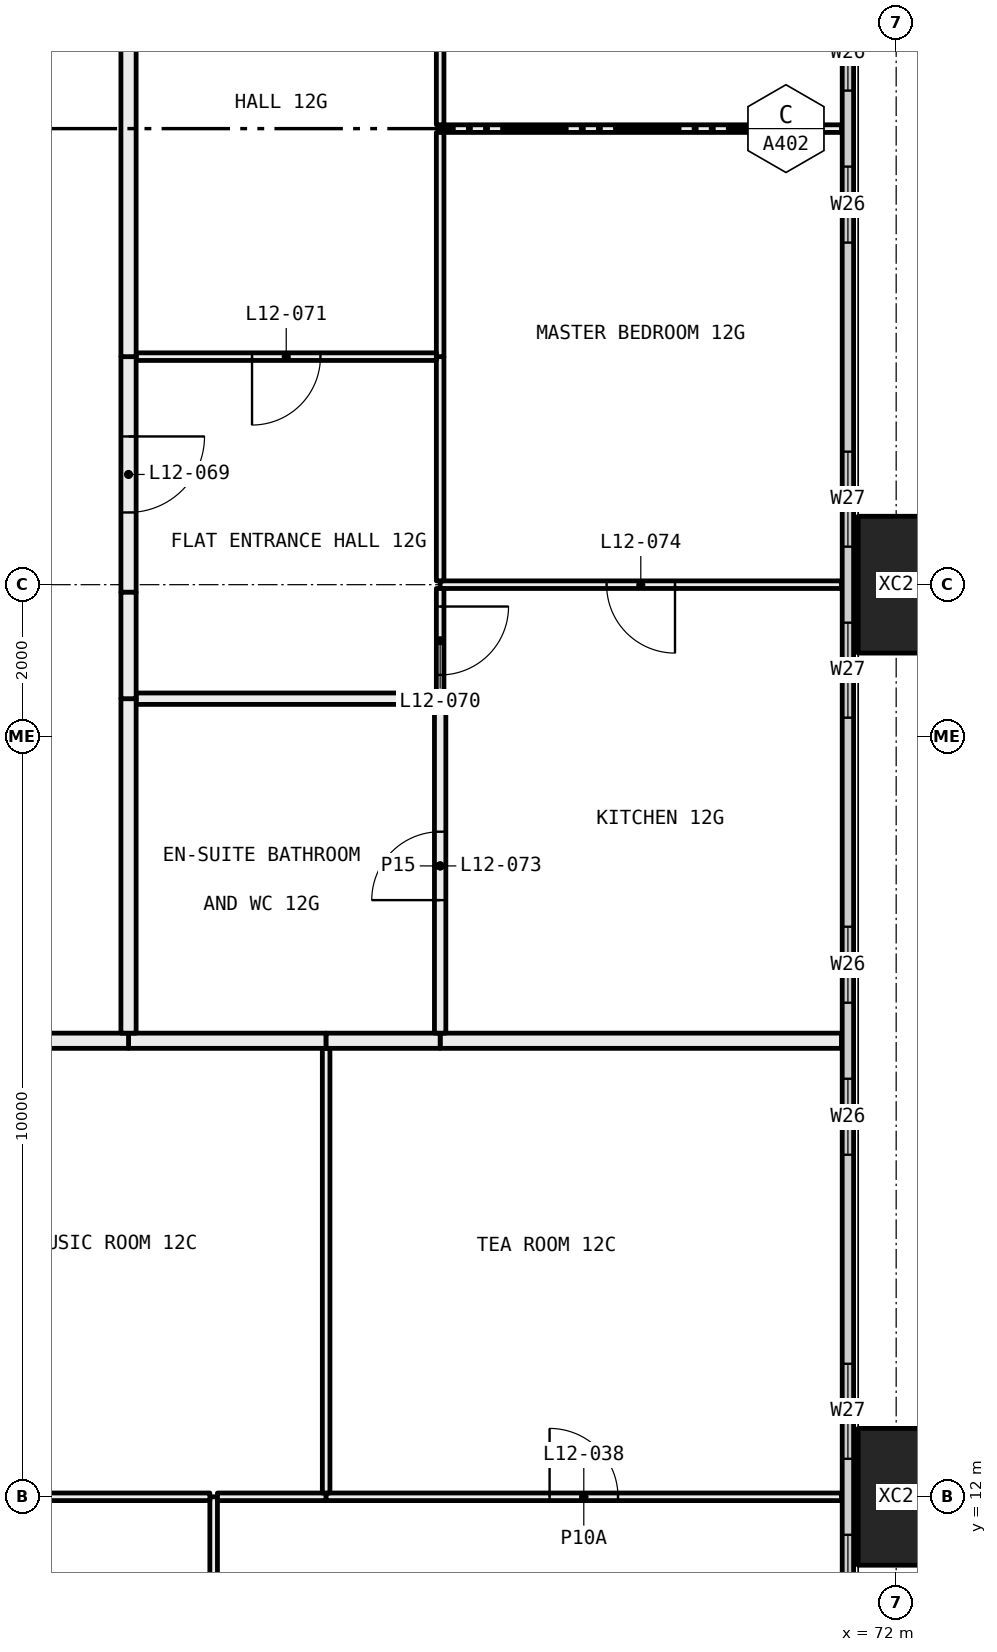
"""IFC4 building model, lengths in metres.
Left out: names, types, materials, properties, quantities, classifications, styles, units other than length and angle.
Written with IfcOpenShell. Run it as: python <this file> out.ifc"""

import sys

from ifc_helpers import new_model, si_unit, direction, frame, frame_2d, origin, origin_2d, place, context, subcontext, project, spatial, rectangle, hollow_rectangle, extrude, element, fill, save


model = new_model("IFC4")
c1 = context("Model", 3, precision=1e-05, world=origin(), true_north=direction((0.0, 1.0)))
c2 = subcontext(c1, "Body", "Model", "MODEL_VIEW")
j1 = project(units=[si_unit("LENGTHUNIT", "METRE"), si_unit("PLANEANGLEUNIT", "RADIAN")], contexts=[c1])
p1 = place(None, origin())
s1 = spatial("IfcSite", under=j1, at=p1, CompositionType="ELEMENT")
p2 = place(p1, origin())
s2 = spatial("IfcBuilding", under=s1, at=p2, CompositionType="ELEMENT")
p3 = place(p2, frame((0.0, 0.0, 54.15)))
s3 = spatial("IfcBuildingStorey", under=s2, at=p3, CompositionType="ELEMENT", Elevation=54.15)
for number, where, z_axis, x_axis in (
    (1, (72.0, 12.0, -0.4), (0.0, 0.0, 1.0), (0.0, 1.0, 0.0)),
    (2, (72.0, 24.0, -0.4), (0.0, 0.0, 1.0), (0.0, 1.0, 0.0)),
):
    element("IfcColumn", number, at=place(p3, frame(where, z_axis=z_axis, x_axis=x_axis)), inside=s3, PredefinedType="COLUMN", context=c2, shape_type="SweptSolid", body=[
        extrude(hollow_rectangle(XDim=1.8, YDim=1.0, WallThickness=0.07, at=origin_2d()), origin(), (0.0, 0.0, 1.0), 3.45),
    ])
p4 = place(p3, frame((71.365, 6.71, 0.0), z_axis=(0.0, 0.0, 1.0), x_axis=(0.0, 1.0, 0.0)))
e3 = element("IfcWall", 3, at=p4, inside=s3, PredefinedType="ELEMENTEDWALL", context=c2, shape_type="SweptSolid", body=[
    extrude(rectangle(XDim=34.58, YDim=0.15, at=frame_2d((17.29, 0.0))), origin(), (0.0, 0.0, 1.0), 3.05),
])
p5 = place(p4, frame((0.29, 0.0, 0.45)))
e4 = element("IfcOpeningElement", 4, at=p5, cuts=e3, PredefinedType="OPENING", context=c2, shape_type="SweptSolid", body=[
    extrude(rectangle(XDim=4.5, YDim=2.55, at=frame_2d((2.25, 1.275))), frame((0.0, 0.085, 0.0), z_axis=(0.0, -1.0, 0.0), x_axis=(1.0, 0.0, 0.0)), (0.0, 0.0, 1.0), 0.17),
])
p6 = place(p4, frame((5.79, 0.0, 0.45)))
e5 = element("IfcOpeningElement", 5, at=p6, cuts=e3, PredefinedType="OPENING", context=c2, shape_type="SweptSolid", body=[
    extrude(rectangle(XDim=1.25, YDim=2.55, at=frame_2d((0.625, 1.275))), frame((0.0, 0.085, 0.0), z_axis=(0.0, -1.0, 0.0), x_axis=(1.0, 0.0, 0.0)), (0.0, 0.0, 1.0), 0.17),
])
p7 = place(p4, frame((9.79, 0.0, 0.45)))
e6 = element("IfcOpeningElement", 6, at=p7, cuts=e3, PredefinedType="OPENING", context=c2, shape_type="SweptSolid", body=[
    extrude(rectangle(XDim=1.0, YDim=2.55, at=frame_2d((0.5, 1.275))), frame((0.0, 0.085, 0.0), z_axis=(0.0, -1.0, 0.0), x_axis=(1.0, 0.0, 0.0)), (0.0, 0.0, 1.0), 0.17),
])
p8 = place(p4, frame((11.79, 0.0, 0.45)))
e7 = element("IfcOpeningElement", 7, at=p8, cuts=e3, PredefinedType="OPENING", context=c2, shape_type="SweptSolid", body=[
    extrude(rectangle(XDim=1.0, YDim=2.55, at=frame_2d((0.5, 1.275))), frame((0.0, 0.085, 0.0), z_axis=(0.0, -1.0, 0.0), x_axis=(1.0, 0.0, 0.0)), (0.0, 0.0, 1.0), 0.17),
])
p9 = place(p4, frame((15.54, 0.0, 0.45)))
e8 = element("IfcOpeningElement", 8, at=p9, cuts=e3, PredefinedType="OPENING", context=c2, shape_type="SweptSolid", body=[
    extrude(rectangle(XDim=1.25, YDim=2.55, at=frame_2d((0.625, 1.275))), frame((0.0, 0.085, 0.0), z_axis=(0.0, -1.0, 0.0), x_axis=(1.0, 0.0, 0.0)), (0.0, 0.0, 1.0), 0.17),
])
p10 = place(p4, frame((17.79, 0.0, 0.45)))
e9 = element("IfcOpeningElement", 9, at=p10, cuts=e3, PredefinedType="OPENING", context=c2, shape_type="SweptSolid", body=[
    extrude(rectangle(XDim=1.25, YDim=2.55, at=frame_2d((0.625, 1.275))), frame((0.0, 0.085, 0.0), z_axis=(0.0, -1.0, 0.0), x_axis=(1.0, 0.0, 0.0)), (0.0, 0.0, 1.0), 0.17),
])
p11 = place(p4, frame((21.79, 0.0, 0.45)))
e10 = element("IfcOpeningElement", 10, at=p11, cuts=e3, PredefinedType="OPENING", context=c2, shape_type="SweptSolid", body=[
    extrude(rectangle(XDim=1.0, YDim=2.55, at=frame_2d((0.5, 1.275))), frame((0.0, 0.085, 0.0), z_axis=(0.0, -1.0, 0.0), x_axis=(1.0, 0.0, 0.0)), (0.0, 0.0, 1.0), 0.17),
])
p12 = place(p4, frame((23.79, 0.0, 0.45)))
e11 = element("IfcOpeningElement", 11, at=p12, cuts=e3, PredefinedType="OPENING", context=c2, shape_type="SweptSolid", body=[
    extrude(rectangle(XDim=1.0, YDim=2.55, at=frame_2d((0.5, 1.275))), frame((0.0, 0.085, 0.0), z_axis=(0.0, -1.0, 0.0), x_axis=(1.0, 0.0, 0.0)), (0.0, 0.0, 1.0), 0.17),
])
p13 = place(p4, frame((27.54, 0.0, 0.45)))
e12 = element("IfcOpeningElement", 12, at=p13, cuts=e3, PredefinedType="OPENING", context=c2, shape_type="SweptSolid", body=[
    extrude(rectangle(XDim=1.25, YDim=2.55, at=frame_2d((0.625, 1.275))), frame((0.0, 0.085, 0.0), z_axis=(0.0, -1.0, 0.0), x_axis=(1.0, 0.0, 0.0)), (0.0, 0.0, 1.0), 0.17),
])
p14 = place(p4, frame((29.79, 0.0, 0.45)))
e13 = element("IfcOpeningElement", 13, at=p14, cuts=e3, PredefinedType="OPENING", context=c2, shape_type="SweptSolid", body=[
    extrude(rectangle(XDim=4.5, YDim=2.55, at=frame_2d((2.25, 1.275))), frame((0.0, 0.085, 0.0), z_axis=(0.0, -1.0, 0.0), x_axis=(1.0, 0.0, 0.0)), (0.0, 0.0, 1.0), 0.17),
])
p15 = place(p3, frame((63.02, 6.05, 0.0), z_axis=(0.0, 0.0, 1.0), x_axis=(0.0, 1.0, 0.0)))
e14 = element("IfcWall", 14, at=p15, inside=s3, PredefinedType="PARTITIONING", context=c2, shape_type="SweptSolid", body=[
    extrude(rectangle(XDim=5.95, YDim=0.1, at=frame_2d((2.975, 0.0))), origin(), (0.0, 0.0, 1.0), 2.45),
])
p16 = place(p15, frame((2.525, 0.0, 0.0)))
e15 = element("IfcOpeningElement", 15, at=p16, cuts=e14, PredefinedType="OPENING", context=c2, shape_type="SweptSolid", body=[
    extrude(rectangle(XDim=0.9, YDim=2.1, at=frame_2d((0.45, 1.05))), frame((0.0, 0.06, 0.0), z_axis=(0.0, -1.0, 0.0), x_axis=(1.0, 0.0, 0.0)), (0.0, 0.0, 1.0), 0.12),
])
p17 = place(p3, frame((62.97, 12.0, 0.0), z_axis=(0.0, 0.0, 1.0), x_axis=(-1.0, 0.0, 0.0)))
e16 = element("IfcWall", 16, at=p17, inside=s3, PredefinedType="PARTITIONING", context=c2, shape_type="SweptSolid", body=[
    extrude(rectangle(XDim=2.17, YDim=0.1, at=frame_2d((1.085, 0.0))), origin(), (0.0, 0.0, 1.0), 2.45),
])
p18 = place(p3, frame((64.5, 12.0, 0.0), z_axis=(0.0, 0.0, 1.0), x_axis=(-1.0, 0.0, 0.0)))
e17 = element("IfcWall", 17, at=p18, inside=s3, PredefinedType="PARTITIONING", context=c2, shape_type="SweptSolid", body=[
    extrude(rectangle(XDim=1.43, YDim=0.1, at=frame_2d((0.715, 0.0))), origin(), (0.0, 0.0, 1.0), 2.45),
])
p19 = place(p3, frame((71.28, 12.0, 0.0), z_axis=(0.0, 0.0, 1.0), x_axis=(-1.0, 0.0, 0.0)))
e18 = element("IfcWall", 18, at=p19, inside=s3, PredefinedType="PARTITIONING", context=c2, shape_type="SweptSolid", body=[
    extrude(rectangle(XDim=6.78, YDim=0.1, at=frame_2d((3.39, 0.0))), origin(), (0.0, 0.0, 1.0), 2.45),
])
p20 = place(p19, frame((2.94, 0.0, 0.0)))
e19 = element("IfcOpeningElement", 19, at=p20, cuts=e18, PredefinedType="OPENING", context=c2, shape_type="SweptSolid", body=[
    extrude(rectangle(XDim=0.9, YDim=2.1, at=frame_2d((0.45, 1.05))), frame((0.0, 0.06, 0.0), z_axis=(0.0, -1.0, 0.0), x_axis=(1.0, 0.0, 0.0)), (0.0, 0.0, 1.0), 0.12),
])
p21 = place(p3, frame((64.5, 12.05, 0.0), z_axis=(0.0, 0.0, 1.0), x_axis=(0.0, 1.0, 0.0)))
e20 = element("IfcWall", 20, at=p21, inside=s3, PredefinedType="PARTITIONING", context=c2, shape_type="SweptSolid", body=[
    extrude(rectangle(XDim=5.85, YDim=0.1, at=frame_2d((2.925, 0.0))), origin(), (0.0, 0.0, 1.0), 2.45),
])
p22 = place(p3, frame((64.5, 18.0, 0.0), z_axis=(0.0, 0.0, 1.0), x_axis=(-1.0, 0.0, 0.0)))
e21 = element("IfcWall", 21, at=p22, inside=s3, PredefinedType="PARTITIONING", context=c2, shape_type="SweptSolid", body=[
    extrude(rectangle(XDim=2.6, YDim=0.2, at=frame_2d((1.3, 0.0))), origin(), (0.0, 0.0, 1.0), 3.05),
])
p23 = place(p3, frame((61.9, 18.0, 0.0), z_axis=(0.0, 0.0, 1.0), x_axis=(-1.0, 0.0, 0.0)))
e22 = element("IfcWall", 22, at=p23, inside=s3, PredefinedType="PARTITIONING", context=c2, shape_type="SweptSolid", body=[
    extrude(rectangle(XDim=4.9, YDim=0.2, at=frame_2d((2.45, 0.0))), origin(), (0.0, 0.0, 1.0), 3.05),
])
p24 = place(p3, frame((71.28, 18.0, 0.0), z_axis=(0.0, 0.0, 1.0), x_axis=(-1.0, 0.0, 0.0)))
e23 = element("IfcWall", 23, at=p24, inside=s3, PredefinedType="PARTITIONING", context=c2, shape_type="SweptSolid", body=[
    extrude(rectangle(XDim=5.28, YDim=0.2, at=frame_2d((2.64, 0.0))), origin(), (0.0, 0.0, 1.0), 3.05),
])
p25 = place(p3, frame((66.0, 18.0, 0.0), z_axis=(0.0, 0.0, 1.0), x_axis=(-1.0, 0.0, 0.0)))
e24 = element("IfcWall", 24, at=p25, inside=s3, PredefinedType="PARTITIONING", context=c2, shape_type="SweptSolid", body=[
    extrude(rectangle(XDim=1.5, YDim=0.2, at=frame_2d((0.75, 0.0))), origin(), (0.0, 0.0, 1.0), 3.05),
])
p26 = place(p3, frame((71.28, 24.0, 0.0), z_axis=(0.0, 0.0, 1.0), x_axis=(-1.0, 0.0, 0.0)))
e25 = element("IfcWall", 25, at=p26, inside=s3, PredefinedType="PARTITIONING", context=c2, shape_type="SweptSolid", body=[
    extrude(rectangle(XDim=5.28, YDim=0.1, at=frame_2d((2.64, 0.0))), origin(), (0.0, 0.0, 1.0), 2.45),
])
p27 = place(p26, frame((2.19, 0.0, 0.0)))
e26 = element("IfcOpeningElement", 26, at=p27, cuts=e25, PredefinedType="OPENING", context=c2, shape_type="SweptSolid", body=[
    extrude(rectangle(XDim=0.9, YDim=2.1, at=frame_2d((0.45, 1.05))), frame((0.0, 0.06, 0.0), z_axis=(0.0, -1.0, 0.0), x_axis=(1.0, 0.0, 0.0)), (0.0, 0.0, 1.0), 0.12),
])
p28 = place(p3, frame((66.0, 22.5, 0.0), z_axis=(0.0, 0.0, 1.0), x_axis=(0.0, -1.0, 0.0)))
e27 = element("IfcWall", 27, at=p28, inside=s3, PredefinedType="PARTITIONING", context=c2, shape_type="SweptSolid", body=[
    extrude(rectangle(XDim=4.4, YDim=0.15, at=frame_2d((2.2, 0.0))), origin(), (0.0, 0.0, 1.0), 3.05),
])
p29 = place(p28, frame((1.75, 0.0, 0.0)))
e28 = element("IfcOpeningElement", 28, at=p29, cuts=e27, PredefinedType="OPENING", context=c2, shape_type="SweptSolid", body=[
    extrude(rectangle(XDim=0.9, YDim=2.1, at=frame_2d((0.45, 1.05))), frame((0.0, 0.085, 0.0), z_axis=(0.0, -1.0, 0.0), x_axis=(1.0, 0.0, 0.0)), (0.0, 0.0, 1.0), 0.17),
])
p30 = place(p3, frame((66.0, 23.95, 0.0), z_axis=(0.0, 0.0, 1.0), x_axis=(0.0, -1.0, 0.0)))
e29 = element("IfcWall", 29, at=p30, inside=s3, PredefinedType="PARTITIONING", context=c2, shape_type="SweptSolid", body=[
    extrude(rectangle(XDim=1.375, YDim=0.1, at=frame_2d((0.688, 0.0))), origin(), (0.0, 0.0, 1.0), 2.45),
])
p31 = place(p30, frame((0.238, 0.0, 0.0)))
e30 = element("IfcOpeningElement", 30, at=p31, cuts=e29, PredefinedType="OPENING", context=c2, shape_type="SweptSolid", body=[
    extrude(rectangle(XDim=0.9, YDim=2.1, at=frame_2d((0.45, 1.05))), frame((0.0, 0.06, 0.0), z_axis=(0.0, -1.0, 0.0), x_axis=(1.0, 0.0, 0.0)), (0.0, 0.0, 1.0), 0.12),
])
p32 = place(p3, frame((71.28, 30.0, 0.0), z_axis=(0.0, 0.0, 1.0), x_axis=(-1.0, 0.0, 0.0)))
e31 = element("IfcWall", 31, at=p32, inside=s3, PredefinedType="PARTITIONING", context=c2, shape_type="SweptSolid", body=[
    extrude(rectangle(XDim=5.28, YDim=0.1, at=frame_2d((2.64, 0.0))), origin(), (0.0, 0.0, 1.0), 3.05),
])
p33 = place(p3, frame((66.0, 27.0, 0.0), z_axis=(0.0, 0.0, 1.0), x_axis=(0.0, -1.0, 0.0)))
e32 = element("IfcWall", 32, at=p33, inside=s3, PredefinedType="PARTITIONING", context=c2, shape_type="SweptSolid", body=[
    extrude(rectangle(XDim=2.95, YDim=0.1, at=frame_2d((1.475, 0.0))), origin(), (0.0, 0.0, 1.0), 2.45),
])
p34 = place(p3, frame((66.0, 29.95, 0.0), z_axis=(0.0, 0.0, 1.0), x_axis=(0.0, -1.0, 0.0)))
e33 = element("IfcWall", 33, at=p34, inside=s3, PredefinedType="PARTITIONING", context=c2, shape_type="SweptSolid", body=[
    extrude(rectangle(XDim=2.95, YDim=0.1, at=frame_2d((1.475, 0.0))), origin(), (0.0, 0.0, 1.0), 3.05),
])
p35 = place(p3, frame((66.0, 35.9, 0.0), z_axis=(0.0, 0.0, 1.0), x_axis=(0.0, -1.0, 0.0)))
e34 = element("IfcWall", 34, at=p35, inside=s3, PredefinedType="PARTITIONING", context=c2, shape_type="SweptSolid", body=[
    extrude(rectangle(XDim=5.85, YDim=0.1, at=frame_2d((2.925, 0.0))), origin(), (0.0, 0.0, 1.0), 3.05),
])
p36 = place(p35, frame((2.475, 0.0, 0.0)))
e35 = element("IfcOpeningElement", 35, at=p36, cuts=e34, PredefinedType="OPENING", context=c2, shape_type="SweptSolid", body=[
    extrude(rectangle(XDim=0.9, YDim=2.1, at=frame_2d((0.45, 1.05))), frame((0.0, 0.06, 0.0), z_axis=(0.0, -1.0, 0.0), x_axis=(1.0, 0.0, 0.0)), (0.0, 0.0, 1.0), 0.12),
])
p37 = place(p3, frame((65.925, 22.5, 0.0), z_axis=(0.0, 0.0, 1.0), x_axis=(-1.0, 0.0, 0.0)))
e36 = element("IfcWall", 36, at=p37, inside=s3, PredefinedType="PARTITIONING", context=c2, shape_type="SweptSolid", body=[
    extrude(rectangle(XDim=3.925, YDim=0.15, at=frame_2d((1.962, 0.0))), origin(), (0.0, 0.0, 1.0), 3.05),
])
p38 = place(p3, frame((61.9, 22.5, 0.0), z_axis=(0.0, 0.0, 1.0), x_axis=(0.0, -1.0, 0.0)))
e37 = element("IfcWall", 37, at=p38, inside=s3, PredefinedType="PARTITIONING", context=c2, shape_type="SweptSolid", body=[
    extrude(rectangle(XDim=4.4, YDim=0.2, at=frame_2d((2.2, 0.0))), origin(), (0.0, 0.0, 1.0), 3.05),
])
p39 = place(p3, frame((65.95, 27.0, 0.0), z_axis=(0.0, 0.0, 1.0), x_axis=(-1.0, 0.0, 0.0)))
e38 = element("IfcWall", 38, at=p39, inside=s3, PredefinedType="PARTITIONING", context=c2, shape_type="SweptSolid", body=[
    extrude(rectangle(XDim=3.95, YDim=0.1, at=frame_2d((1.975, 0.0))), origin(), (0.0, 0.0, 1.0), 3.05),
])
p40 = place(p39, frame((1.525, 0.0, 0.0)))
e39 = element("IfcOpeningElement", 39, at=p40, cuts=e38, PredefinedType="OPENING", context=c2, shape_type="SweptSolid", body=[
    extrude(rectangle(XDim=0.9, YDim=2.1, at=frame_2d((0.45, 1.05))), frame((0.0, 0.06, 0.0), z_axis=(0.0, -1.0, 0.0), x_axis=(1.0, 0.0, 0.0)), (0.0, 0.0, 1.0), 0.12),
])
p41 = place(p3, frame((61.9, 27.0, 0.0), z_axis=(0.0, 0.0, 1.0), x_axis=(0.0, -1.0, 0.0)))
e40 = element("IfcWall", 40, at=p41, inside=s3, PredefinedType="PARTITIONING", context=c2, shape_type="SweptSolid", body=[
    extrude(rectangle(XDim=3.1, YDim=0.2, at=frame_2d((1.55, 0.0))), origin(), (0.0, 0.0, 1.0), 2.45),
])
p42 = place(p41, frame((1.05, 0.0, 0.0)))
e41 = element("IfcOpeningElement", 41, at=p42, cuts=e40, PredefinedType="OPENING", context=c2, shape_type="SweptSolid", body=[
    extrude(rectangle(XDim=1.0, YDim=2.1, at=frame_2d((0.5, 1.05))), frame((0.0, 0.11, 0.0), z_axis=(0.0, -1.0, 0.0), x_axis=(1.0, 0.0, 0.0)), (0.0, 0.0, 1.0), 0.22),
])
p43 = place(p3, frame((61.9, 23.9, 0.0), z_axis=(0.0, 0.0, 1.0), x_axis=(0.0, -1.0, 0.0)))
e42 = element("IfcWall", 42, at=p43, inside=s3, PredefinedType="PARTITIONING", context=c2, shape_type="SweptSolid", body=[
    extrude(rectangle(XDim=1.4, YDim=0.2, at=frame_2d((0.7, 0.0))), origin(), (0.0, 0.0, 1.0), 3.05),
])
p44 = place(p3, frame((61.9, 35.9, 0.0), z_axis=(0.0, 0.0, 1.0), x_axis=(0.0, -1.0, 0.0)))
e43 = element("IfcWall", 43, at=p44, inside=s3, PredefinedType="PARTITIONING", context=c2, shape_type="SweptSolid", body=[
    extrude(rectangle(XDim=8.9, YDim=0.2, at=frame_2d((4.45, 0.0))), origin(), (0.0, 0.0, 1.0), 3.05),
])
p45 = place(p5, origin())
e44 = element("IfcWindow", 44, at=p45, inside=s3, PartitioningType="SINGLE_PANEL", PredefinedType="WINDOW", context=c2, shape_type="SweptSolid", body=[
    extrude(rectangle(XDim=4.5, YDim=2.55, at=frame_2d((2.25, 1.275))), frame((0.0, 0.03, 0.0), z_axis=(0.0, -1.0, 0.0), x_axis=(1.0, 0.0, 0.0)), (0.0, 0.0, 1.0), 0.06),
])
fill(e4, e44)
p46 = place(p6, origin())
e45 = element("IfcWindow", 45, at=p46, inside=s3, PartitioningType="SINGLE_PANEL", PredefinedType="WINDOW", context=c2, shape_type="SweptSolid", body=[
    extrude(rectangle(XDim=1.25, YDim=2.55, at=frame_2d((0.625, 1.275))), frame((0.0, 0.03, 0.0), z_axis=(0.0, -1.0, 0.0), x_axis=(1.0, 0.0, 0.0)), (0.0, 0.0, 1.0), 0.06),
])
fill(e5, e45)
p47 = place(p7, origin())
e46 = element("IfcWindow", 46, at=p47, inside=s3, PartitioningType="SINGLE_PANEL", PredefinedType="WINDOW", context=c2, shape_type="SweptSolid", body=[
    extrude(rectangle(XDim=1.0, YDim=2.55, at=frame_2d((0.5, 1.275))), frame((0.0, 0.03, 0.0), z_axis=(0.0, -1.0, 0.0), x_axis=(1.0, 0.0, 0.0)), (0.0, 0.0, 1.0), 0.06),
])
fill(e6, e46)
p48 = place(p8, origin())
e47 = element("IfcWindow", 47, at=p48, inside=s3, PartitioningType="SINGLE_PANEL", PredefinedType="WINDOW", context=c2, shape_type="SweptSolid", body=[
    extrude(rectangle(XDim=1.0, YDim=2.55, at=frame_2d((0.5, 1.275))), frame((0.0, 0.03, 0.0), z_axis=(0.0, -1.0, 0.0), x_axis=(1.0, 0.0, 0.0)), (0.0, 0.0, 1.0), 0.06),
])
fill(e7, e47)
p49 = place(p9, origin())
e48 = element("IfcWindow", 48, at=p49, inside=s3, PartitioningType="SINGLE_PANEL", PredefinedType="WINDOW", context=c2, shape_type="SweptSolid", body=[
    extrude(rectangle(XDim=1.25, YDim=2.55, at=frame_2d((0.625, 1.275))), frame((0.0, 0.03, 0.0), z_axis=(0.0, -1.0, 0.0), x_axis=(1.0, 0.0, 0.0)), (0.0, 0.0, 1.0), 0.06),
])
fill(e8, e48)
p50 = place(p10, origin())
e49 = element("IfcWindow", 49, at=p50, inside=s3, PartitioningType="SINGLE_PANEL", PredefinedType="WINDOW", context=c2, shape_type="SweptSolid", body=[
    extrude(rectangle(XDim=1.25, YDim=2.55, at=frame_2d((0.625, 1.275))), frame((0.0, 0.03, 0.0), z_axis=(0.0, -1.0, 0.0), x_axis=(1.0, 0.0, 0.0)), (0.0, 0.0, 1.0), 0.06),
])
fill(e9, e49)
p51 = place(p11, origin())
e50 = element("IfcWindow", 50, at=p51, inside=s3, PartitioningType="SINGLE_PANEL", PredefinedType="WINDOW", context=c2, shape_type="SweptSolid", body=[
    extrude(rectangle(XDim=1.0, YDim=2.55, at=frame_2d((0.5, 1.275))), frame((0.0, 0.03, 0.0), z_axis=(0.0, -1.0, 0.0), x_axis=(1.0, 0.0, 0.0)), (0.0, 0.0, 1.0), 0.06),
])
fill(e10, e50)
p52 = place(p12, origin())
e51 = element("IfcWindow", 51, at=p52, inside=s3, PartitioningType="SINGLE_PANEL", PredefinedType="WINDOW", context=c2, shape_type="SweptSolid", body=[
    extrude(rectangle(XDim=1.0, YDim=2.55, at=frame_2d((0.5, 1.275))), frame((0.0, 0.03, 0.0), z_axis=(0.0, -1.0, 0.0), x_axis=(1.0, 0.0, 0.0)), (0.0, 0.0, 1.0), 0.06),
])
fill(e11, e51)
p53 = place(p20, frame((0.9, 0.0, 0.0), x_axis=(-1.0, 0.0, 0.0)))
e52 = element("IfcDoor", 52, at=p53, inside=s3, OperationType="SINGLE_SWING_RIGHT", PredefinedType="DOOR", context=c2, shape_type="SweptSolid", body=[
    extrude(rectangle(XDim=0.9, YDim=2.1, at=frame_2d((0.45, 1.05))), frame((0.0, 0.025, 0.0), z_axis=(0.0, -1.0, 0.0), x_axis=(1.0, 0.0, 0.0)), (0.0, 0.0, 1.0), 0.05),
])
fill(e19, e52)
p54 = place(p42, origin())
e53 = element("IfcDoor", 53, at=p54, inside=s3, OperationType="SINGLE_SWING_RIGHT", PredefinedType="DOOR", context=c2, shape_type="SweptSolid", body=[
    extrude(rectangle(XDim=1.0, YDim=2.1, at=frame_2d((0.5, 1.05))), frame((0.0, 0.025, 0.0), z_axis=(0.0, -1.0, 0.0), x_axis=(1.0, 0.0, 0.0)), (0.0, 0.0, 1.0), 0.05),
])
fill(e41, e53)
p55 = place(p31, origin())
e54 = element("IfcDoor", 54, at=p55, inside=s3, OperationType="SINGLE_SWING_RIGHT", PredefinedType="DOOR", context=c2, shape_type="SweptSolid", body=[
    extrude(rectangle(XDim=0.9, YDim=2.1, at=frame_2d((0.45, 1.05))), frame((0.0, 0.025, 0.0), z_axis=(0.0, -1.0, 0.0), x_axis=(1.0, 0.0, 0.0)), (0.0, 0.0, 1.0), 0.05),
])
fill(e30, e54)
p56 = place(p40, origin())
e55 = element("IfcDoor", 55, at=p56, inside=s3, OperationType="SINGLE_SWING_LEFT", PredefinedType="DOOR", context=c2, shape_type="SweptSolid", body=[
    extrude(rectangle(XDim=0.9, YDim=2.1, at=frame_2d((0.45, 1.05))), frame((0.0, 0.025, 0.0), z_axis=(0.0, -1.0, 0.0), x_axis=(1.0, 0.0, 0.0)), (0.0, 0.0, 1.0), 0.05),
])
fill(e39, e55)
p57 = place(p29, frame((0.9, 0.0, 0.0), x_axis=(-1.0, 0.0, 0.0)))
e56 = element("IfcDoor", 56, at=p57, inside=s3, OperationType="SINGLE_SWING_RIGHT", PredefinedType="DOOR", context=c2, shape_type="SweptSolid", body=[
    extrude(rectangle(XDim=0.9, YDim=2.1, at=frame_2d((0.45, 1.05))), frame((0.0, 0.025, 0.0), z_axis=(0.0, -1.0, 0.0), x_axis=(1.0, 0.0, 0.0)), (0.0, 0.0, 1.0), 0.05),
])
fill(e28, e56)
p58 = place(p27, origin())
e57 = element("IfcDoor", 57, at=p58, inside=s3, OperationType="SINGLE_SWING_RIGHT", PredefinedType="DOOR", context=c2, shape_type="SweptSolid", body=[
    extrude(rectangle(XDim=0.9, YDim=2.1, at=frame_2d((0.45, 1.05))), frame((0.0, 0.025, 0.0), z_axis=(0.0, -1.0, 0.0), x_axis=(1.0, 0.0, 0.0)), (0.0, 0.0, 1.0), 0.05),
])
fill(e26, e57)
save(model, sys.argv[1])
